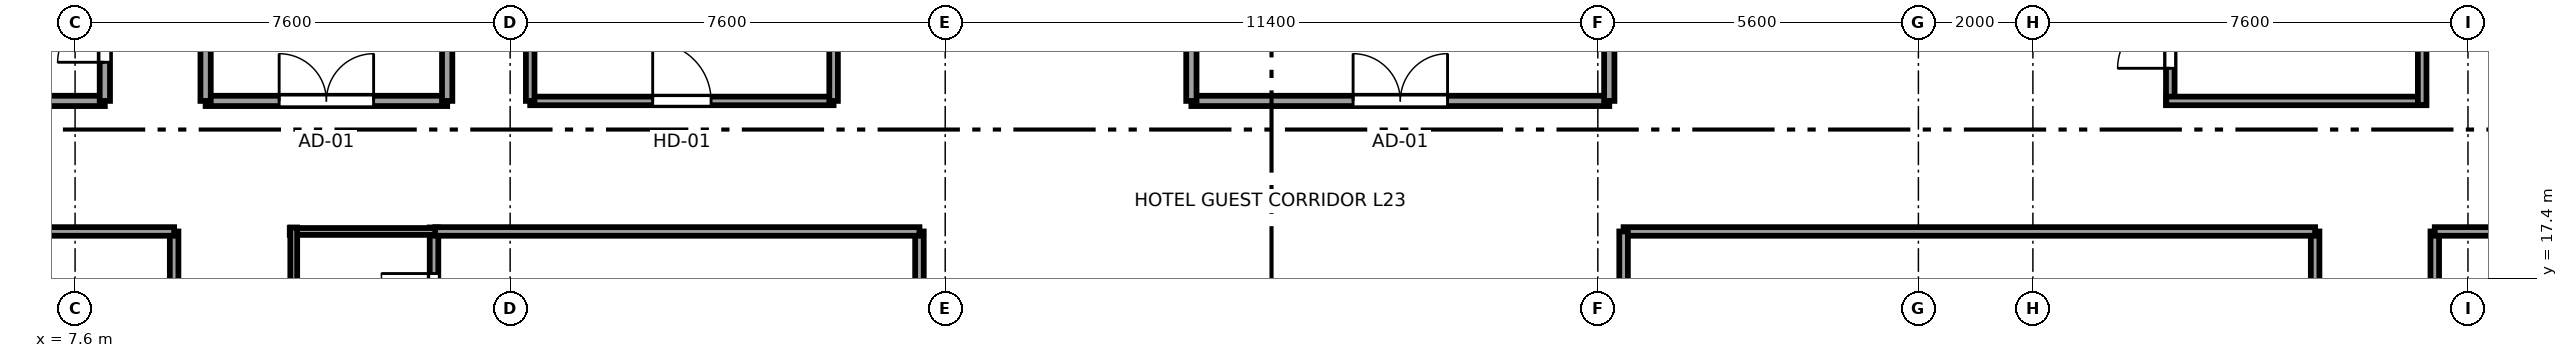
"""IFC4 building model, lengths in metres.
Left out: names, types, materials, properties, quantities, classifications, styles, units other than length and angle.
Written with IfcOpenShell. Run it as: python <this file> out.ifc"""

import sys

from ifc_helpers import new_model, si_unit, direction, frame, frame_2d, origin, place, context, subcontext, project, spatial, rectangle, extrude, source, transform, mapped, element, fill, save


model = new_model("IFC4")
c1 = context("Model", 3, precision=1e-05, world=origin(), true_north=direction((0.0, 1.0)))
c2 = subcontext(c1, "Body", "Model", "MODEL_VIEW")
j1 = project(units=[si_unit("LENGTHUNIT", "METRE"), si_unit("PLANEANGLEUNIT", "RADIAN")], contexts=[c1])
p1 = place(None, origin())
s1 = spatial("IfcSite", under=j1, at=p1, CompositionType="ELEMENT")
p2 = place(p1, origin())
s2 = spatial("IfcBuilding", under=s1, at=p2, CompositionType="ELEMENT")
p3 = place(p2, frame((0.0, 0.0, 92.35)))
s3 = spatial("IfcBuildingStorey", under=s2, at=p3, CompositionType="ELEMENT", Elevation=92.35)
p4 = place(p3, frame((13.87, 15.9, 0.0), z_axis=(0.0, 0.0, 1.0), x_axis=(0.0, 1.0, 0.0)))
e1 = element("IfcWall", 1, at=p4, inside=s3, PredefinedType="PARTITIONING", context=c2, shape_type="SweptSolid", body=[
    extrude(rectangle(XDim=2.39, YDim=0.15, at=frame_2d((1.195, 0.0))), origin(), (0.0, 0.0, 1.0), 3.25),
])
p5 = place(p4, frame((0.665, 0.0, 0.0)))
e2 = element("IfcOpeningElement", 2, at=p5, cuts=e1, PredefinedType="OPENING", context=c2, shape_type="SweptSolid", body=[
    extrude(rectangle(XDim=0.92, YDim=2.01, at=frame_2d((0.46, 1.005))), frame((0.0, 0.085, 0.0), z_axis=(0.0, -1.0, 0.0), x_axis=(1.0, 0.0, 0.0)), (0.0, 0.0, 1.0), 0.17),
])
p6 = place(p3, frame((11.35, 18.22, 0.0), z_axis=(0.0, 0.0, 1.0), x_axis=(1.0, 0.0, 0.0)))
e3 = element("IfcWall", 3, at=p6, inside=s3, PredefinedType="PLUMBINGWALL", context=c2, shape_type="SweptSolid", body=[
    extrude(rectangle(XDim=2.59, YDim=0.12, at=frame_2d((1.295, 0.0))), origin(), (0.0, 0.0, 1.0), 3.25),
])
p7 = place(p3, frame((11.42, 15.9, 0.0), z_axis=(0.0, 0.0, 1.0), x_axis=(0.0, 1.0, 0.0)))
e4 = element("IfcWall", 4, at=p7, inside=s3, PredefinedType="PLUMBINGWALL", context=c2, shape_type="SweptSolid", body=[
    extrude(rectangle(XDim=2.39, YDim=0.12, at=frame_2d((1.195, 0.0))), origin(), (0.0, 0.0, 1.0), 2.834),
])
p8 = place(p3, frame((9.33, 11.81, 0.0), z_axis=(0.0, 0.0, 1.0), x_axis=(0.0, 1.0, 0.0)))
e5 = element("IfcWall", 5, at=p8, inside=s3, PredefinedType="PARTITIONING", context=c2, shape_type="SweptSolid", body=[
    extrude(rectangle(XDim=6.41, YDim=0.15, at=frame_2d((3.205, 0.0))), origin(), (0.0, 0.0, 1.0), 3.25),
])
p9 = place(p8, frame((2.695, 0.0, 0.0)))
e6 = element("IfcOpeningElement", 6, at=p9, cuts=e5, PredefinedType="OPENING", context=c2, shape_type="SweptSolid", body=[
    extrude(rectangle(XDim=0.98, YDim=2.12, at=frame_2d((0.49, 1.06))), frame((0.0, 0.085, 0.0), z_axis=(0.0, -1.0, 0.0), x_axis=(1.0, 0.0, 0.0)), (0.0, 0.0, 1.0), 0.17),
])
p10 = place(p3, frame((0.405, 18.22, 0.0), z_axis=(0.0, 0.0, 1.0), x_axis=(1.0, 0.0, 0.0)))
e7 = element("IfcWall", 7, at=p10, inside=s3, PredefinedType="PARTITIONING", context=c2, shape_type="SweptSolid", body=[
    extrude(rectangle(XDim=8.925, YDim=0.15, at=frame_2d((4.462, 0.0))), origin(), (0.0, 0.0, 1.0), 3.25),
])
p11 = place(p3, frame((22.35, 0.405, 0.0), z_axis=(0.0, 0.0, 1.0), x_axis=(0.0, 1.0, 0.0)))
e8 = element("IfcWall", 8, at=p11, inside=s3, PredefinedType="PARTITIONING", context=c2, shape_type="SweptSolid", body=[
    extrude(rectangle(XDim=17.815, YDim=0.15, at=frame_2d((8.907, 0.0))), origin(), (0.0, 0.0, 1.0), 3.25),
])
p12 = place(p3, frame((13.89, 18.22, 0.0), z_axis=(0.0, 0.0, 1.0), x_axis=(1.0, 0.0, 0.0)))
e9 = element("IfcWall", 9, at=p12, inside=s3, PredefinedType="PARTITIONING", context=c2, shape_type="SweptSolid", body=[
    extrude(rectangle(XDim=8.46, YDim=0.15, at=frame_2d((4.23, 0.0))), origin(), (0.0, 0.0, 1.0), 3.25),
])
p13 = place(p3, frame((46.73, 11.76, 0.0), z_axis=(0.0, 0.0, 1.0), x_axis=(0.0, 1.0, 0.0)))
e10 = element("IfcWall", 10, at=p13, inside=s3, PredefinedType="PARTITIONING", context=c2, shape_type="SweptSolid", body=[
    extrude(rectangle(XDim=6.46, YDim=0.15, at=frame_2d((3.23, 0.0))), origin(), (0.0, 0.0, 1.0), 3.25),
])
p14 = place(p13, frame((2.72, 0.0, 0.0)))
e11 = element("IfcOpeningElement", 11, at=p14, cuts=e10, PredefinedType="OPENING", context=c2, shape_type="SweptSolid", body=[
    extrude(rectangle(XDim=0.98, YDim=2.12, at=frame_2d((0.49, 1.06))), frame((0.0, 0.085, 0.0), z_axis=(0.0, -1.0, 0.0), x_axis=(1.0, 0.0, 0.0)), (0.0, 0.0, 1.0), 0.17),
])
p15 = place(p3, frame((34.65, 18.22, 0.0), z_axis=(0.0, 0.0, 1.0), x_axis=(1.0, 0.0, 0.0)))
e12 = element("IfcWall", 12, at=p15, inside=s3, PredefinedType="PARTITIONING", context=c2, shape_type="SweptSolid", body=[
    extrude(rectangle(XDim=12.08, YDim=0.15, at=frame_2d((6.04, 0.0))), origin(), (0.0, 0.0, 1.0), 3.25),
])
p16 = place(p3, frame((34.65, 9.43, 0.0), z_axis=(0.0, 0.0, 1.0), x_axis=(0.0, 1.0, 0.0)))
e13 = element("IfcWall", 13, at=p16, inside=s3, PredefinedType="PARTITIONING", context=c2, shape_type="SweptSolid", body=[
    extrude(rectangle(XDim=8.79, YDim=0.15, at=frame_2d((4.395, 0.0))), origin(), (0.0, 0.0, 1.0), 3.25),
])
p17 = place(p3, frame((48.82, 11.81, 0.0), z_axis=(0.0, 0.0, 1.0), x_axis=(0.0, 1.0, 0.0)))
e14 = element("IfcWall", 14, at=p17, inside=s3, PredefinedType="PARTITIONING", context=c2, shape_type="SweptSolid", body=[
    extrude(rectangle(XDim=6.41, YDim=0.15, at=frame_2d((3.205, 0.0))), origin(), (0.0, 0.0, 1.0), 3.25),
])
p18 = place(p17, frame((1.745, 0.0, 0.0)))
e15 = element("IfcOpeningElement", 15, at=p18, cuts=e14, PredefinedType="OPENING", context=c2, shape_type="SweptSolid", body=[
    extrude(rectangle(XDim=0.98, YDim=2.12, at=frame_2d((0.49, 1.06))), frame((0.0, 0.085, 0.0), z_axis=(0.0, -1.0, 0.0), x_axis=(1.0, 0.0, 0.0)), (0.0, 0.0, 1.0), 0.17),
])
p19 = place(p3, frame((48.82, 18.22, 0.0), z_axis=(0.0, 0.0, 1.0), x_axis=(1.0, 0.0, 0.0)))
e16 = element("IfcWall", 16, at=p19, inside=s3, PredefinedType="PARTITIONING", context=c2, shape_type="SweptSolid", body=[
    extrude(rectangle(XDim=7.775, YDim=0.15, at=frame_2d((3.887, 0.0))), origin(), (0.0, 0.0, 1.0), 3.25),
])
p20 = place(p3, frame((0.405, 20.5, 0.0), z_axis=(0.0, 0.0, 1.0), x_axis=(1.0, 0.0, 0.0)))
e17 = element("IfcWall", 17, at=p20, inside=s3, PredefinedType="PARTITIONING", context=c2, shape_type="SweptSolid", body=[
    extrude(rectangle(XDim=7.715, YDim=0.18, at=frame_2d((3.857, 0.0))), origin(), (0.0, 0.0, 1.0), 3.25),
])
p21 = place(p3, frame((8.12, 20.5, 0.0), z_axis=(0.0, 0.0, 1.0), x_axis=(0.0, 1.0, 0.0)))
e18 = element("IfcWall", 18, at=p21, inside=s3, PredefinedType="PARTITIONING", context=c2, shape_type="SweptSolid", body=[
    extrude(rectangle(XDim=3.6, YDim=0.18, at=frame_2d((1.8, 0.0))), origin(), (0.0, 0.0, 1.0), 3.25),
])
p22 = place(p21, frame((0.675, 0.0, 0.0)))
e19 = element("IfcOpeningElement", 19, at=p22, cuts=e18, PredefinedType="OPENING", context=c2, shape_type="SweptSolid", body=[
    extrude(rectangle(XDim=1.65, YDim=2.15, at=frame_2d((0.825, 1.075))), frame((0.0, 0.1, 0.0), z_axis=(0.0, -1.0, 0.0), x_axis=(1.0, 0.0, 0.0)), (0.0, 0.0, 1.0), 0.2),
])
p23 = place(p3, frame((44.2, 20.43, 0.0), z_axis=(0.0, 0.0, 1.0), x_axis=(0.0, 1.0, 0.0)))
e20 = element("IfcWall", 20, at=p23, inside=s3, PredefinedType="PARTITIONING", context=c2, shape_type="SweptSolid", body=[
    extrude(rectangle(XDim=2.54, YDim=0.15, at=frame_2d((1.27, 0.0))), origin(), (0.0, 0.0, 1.0), 3.25),
])
p24 = place(p23, frame((0.64, 0.0, 0.0)))
e21 = element("IfcOpeningElement", 21, at=p24, cuts=e20, PredefinedType="OPENING", context=c2, shape_type="SweptSolid", body=[
    extrude(rectangle(XDim=0.92, YDim=2.01, at=frame_2d((0.46, 1.005))), frame((0.0, 0.085, 0.0), z_axis=(0.0, -1.0, 0.0), x_axis=(1.0, 0.0, 0.0)), (0.0, 0.0, 1.0), 0.17),
])
p25 = place(p3, frame((44.13, 20.5, 0.0), z_axis=(0.0, 0.0, 1.0), x_axis=(1.0, 0.0, 0.0)))
e22 = element("IfcWall", 22, at=p25, inside=s3, PredefinedType="PARTITIONING", context=c2, shape_type="SweptSolid", body=[
    extrude(rectangle(XDim=4.54, YDim=0.15, at=frame_2d((2.27, 0.0))), origin(), (0.0, 0.0, 1.0), 3.25),
])
p26 = place(p3, frame((48.6, 20.43, 0.0), z_axis=(0.0, 0.0, 1.0), x_axis=(0.0, 1.0, 0.0)))
e23 = element("IfcWall", 23, at=p26, inside=s3, PredefinedType="PARTITIONING", context=c2, shape_type="SweptSolid", body=[
    extrude(rectangle(XDim=2.54, YDim=0.15, at=frame_2d((1.27, 0.0))), origin(), (0.0, 0.0, 1.0), 3.25),
])
p27 = place(p3, frame((9.88, 20.5, 0.0), z_axis=(0.0, 0.0, 1.0), x_axis=(1.0, 0.0, 0.0)))
e24 = element("IfcWall", 24, at=p27, inside=s3, PredefinedType="PARTITIONING", context=c2, shape_type="SweptSolid", body=[
    extrude(rectangle(XDim=4.22, YDim=0.18, at=frame_2d((2.11, 0.0))), origin(), (0.0, 0.0, 1.0), 3.25),
])
p28 = place(p27, frame((1.285, 0.0, 0.0)))
e25 = element("IfcOpeningElement", 25, at=p28, cuts=e24, PredefinedType="OPENING", context=c2, shape_type="SweptSolid", body=[
    extrude(rectangle(XDim=1.65, YDim=2.15, at=frame_2d((0.825, 1.075))), frame((0.0, 0.1, 0.0), z_axis=(0.0, -1.0, 0.0), x_axis=(1.0, 0.0, 0.0)), (0.0, 0.0, 1.0), 0.2),
])
for number, where, z_axis, x_axis in (
    (26, (9.88, 20.5, 0.0), (0.0, 0.0, 1.0), (0.0, 1.0, 0.0)),
    (27, (14.1, 20.5, 0.0), (0.0, 0.0, 1.0), (0.0, 1.0, 0.0)),
):
    element("IfcWall", number, at=place(p3, frame(where, z_axis=z_axis, x_axis=x_axis)), inside=s3, PredefinedType="PARTITIONING", context=c2, shape_type="SweptSolid", body=[
        extrude(rectangle(XDim=9.25, YDim=0.18, at=frame_2d((4.625, 0.0))), origin(), (0.0, 0.0, 1.0), 3.25),
    ])
p29 = place(p3, frame((27.1, 20.5, 0.0), z_axis=(0.0, 0.0, 1.0), x_axis=(1.0, 0.0, 0.0)))
e28 = element("IfcWall", 28, at=p29, inside=s3, PredefinedType="PARTITIONING", context=c2, shape_type="SweptSolid", body=[
    extrude(rectangle(XDim=7.3, YDim=0.18, at=frame_2d((3.65, 0.0))), origin(), (0.0, 0.0, 1.0), 3.25),
])
p30 = place(p29, frame((2.825, 0.0, 0.0)))
e29 = element("IfcOpeningElement", 29, at=p30, cuts=e28, PredefinedType="OPENING", context=c2, shape_type="SweptSolid", body=[
    extrude(rectangle(XDim=1.65, YDim=2.15, at=frame_2d((0.825, 1.075))), frame((0.0, 0.1, 0.0), z_axis=(0.0, -1.0, 0.0), x_axis=(1.0, 0.0, 0.0)), (0.0, 0.0, 1.0), 0.2),
])
for number, where, z_axis, x_axis in (
    (30, (27.1, 20.5, 0.0), (0.0, 0.0, 1.0), (0.0, 1.0, 0.0)),
    (31, (34.4, 20.5, 0.0), (0.0, 0.0, 1.0), (0.0, 1.0, 0.0)),
):
    element("IfcWall", number, at=place(p3, frame(where, z_axis=z_axis, x_axis=x_axis)), inside=s3, PredefinedType="PARTITIONING", context=c2, shape_type="SweptSolid", body=[
        extrude(rectangle(XDim=9.3, YDim=0.18, at=frame_2d((4.65, 0.0))), origin(), (0.0, 0.0, 1.0), 3.25),
    ])
p31 = place(p3, frame((15.55, 20.5, 0.0), z_axis=(0.0, 0.0, 1.0), x_axis=(1.0, 0.0, 0.0)))
e32 = element("IfcWall", 32, at=p31, inside=s3, PredefinedType="PARTITIONING", context=c2, shape_type="SweptSolid", body=[
    extrude(rectangle(XDim=5.3, YDim=0.15, at=frame_2d((2.65, 0.0))), origin(), (0.0, 0.0, 1.0), 3.25),
])
p32 = place(p31, frame((2.14, 0.0, 0.0)))
e33 = element("IfcOpeningElement", 33, at=p32, cuts=e32, PredefinedType="OPENING", context=c2, shape_type="SweptSolid", body=[
    extrude(rectangle(XDim=1.02, YDim=2.03, at=frame_2d((0.51, 1.015))), frame((0.0, 0.085, 0.0), z_axis=(0.0, -1.0, 0.0), x_axis=(1.0, 0.0, 0.0)), (0.0, 0.0, 1.0), 0.17),
])
for number, where, z_axis, x_axis in (
    (34, (15.55, 20.5, 0.0), (0.0, 0.0, 1.0), (0.0, 1.0, 0.0)),
    (35, (20.85, 20.5, 0.0), (0.0, 0.0, 1.0), (0.0, 1.0, 0.0)),
):
    element("IfcWall", number, at=place(p3, frame(where, z_axis=z_axis, x_axis=x_axis)), inside=s3, PredefinedType="PARTITIONING", context=c2, shape_type="SweptSolid", body=[
        extrude(rectangle(XDim=9.3, YDim=0.15, at=frame_2d((4.65, 0.0))), origin(), (0.0, 0.0, 1.0), 3.25),
    ])
m1 = source(origin(), c2, "Body", "SweptSolid", [
    extrude(rectangle(XDim=0.92, YDim=2.01, at=frame_2d((0.46, 1.005))), frame((0.0, 0.025, 0.0), z_axis=(0.0, -1.0, 0.0), x_axis=(1.0, 0.0, 0.0)), (0.0, 0.0, 1.0), 0.05),
])
p33 = place(p5, origin())
e36 = element("IfcDoor", 36, at=p33, inside=s3, OperationType="SINGLE_SWING_RIGHT", PredefinedType="DOOR", context=c2, shape_type="MappedRepresentation", body=[
    mapped(m1, transform((0.0, 0.0, 0.0), x_axis=(1.0, 0.0, 0.0), y_axis=(0.0, 1.0, 0.0), z_axis=(0.0, 0.0, 1.0), scale=1.0)),
])
fill(e2, e36)
m2 = source(origin(), c2, "Body", "SweptSolid", [
    extrude(rectangle(XDim=1.65, YDim=2.15, at=frame_2d((0.825, 1.075))), frame((0.0, 0.025, 0.0), z_axis=(0.0, -1.0, 0.0), x_axis=(1.0, 0.0, 0.0)), (0.0, 0.0, 1.0), 0.05),
])
p34 = place(p22, origin())
e37 = element("IfcDoor", 37, at=p34, inside=s3, OperationType="DOUBLE_DOOR_SINGLE_SWING", PredefinedType="DOOR", context=c2, shape_type="MappedRepresentation", body=[
    mapped(m2, transform((0.0, 0.0, 0.0), x_axis=(1.0, 0.0, 0.0), y_axis=(0.0, 1.0, 0.0), z_axis=(0.0, 0.0, 1.0), scale=1.0)),
])
fill(e19, e37)
p35 = place(p24, origin())
e38 = element("IfcDoor", 38, at=p35, inside=s3, OperationType="SINGLE_SWING_LEFT", PredefinedType="DOOR", context=c2, shape_type="MappedRepresentation", body=[
    mapped(m1, transform((0.0, 0.0, 0.0), x_axis=(1.0, 0.0, 0.0), y_axis=(0.0, 1.0, 0.0), z_axis=(0.0, 0.0, 1.0), scale=1.0)),
])
fill(e21, e38)
p36 = place(p28, origin())
e39 = element("IfcDoor", 39, at=p36, inside=s3, OperationType="DOUBLE_DOOR_SINGLE_SWING", PredefinedType="DOOR", context=c2, shape_type="MappedRepresentation", body=[
    mapped(m2, transform((0.0, 0.0, 0.0), x_axis=(1.0, 0.0, 0.0), y_axis=(0.0, 1.0, 0.0), z_axis=(0.0, 0.0, 1.0), scale=1.0)),
])
fill(e25, e39)
p37 = place(p30, origin())
e40 = element("IfcDoor", 40, at=p37, inside=s3, OperationType="DOUBLE_DOOR_SINGLE_SWING", PredefinedType="DOOR", context=c2, shape_type="MappedRepresentation", body=[
    mapped(m2, transform((0.0, 0.0, 0.0), x_axis=(1.0, 0.0, 0.0), y_axis=(0.0, 1.0, 0.0), z_axis=(0.0, 0.0, 1.0), scale=1.0)),
])
fill(e29, e40)
m3 = source(origin(), c2, "Body", "SweptSolid", [
    extrude(rectangle(XDim=1.02, YDim=2.03, at=frame_2d((0.51, 1.015))), frame((0.0, 0.025, 0.0), z_axis=(0.0, -1.0, 0.0), x_axis=(1.0, 0.0, 0.0)), (0.0, 0.0, 1.0), 0.05),
])
p38 = place(p32, origin())
e41 = element("IfcDoor", 41, at=p38, inside=s3, OperationType="SINGLE_SWING_LEFT", PredefinedType="DOOR", context=c2, shape_type="MappedRepresentation", body=[
    mapped(m3, transform((0.0, 0.0, 0.0), x_axis=(1.0, 0.0, 0.0), y_axis=(0.0, 1.0, 0.0), z_axis=(0.0, 0.0, 1.0), scale=1.0)),
])
fill(e33, e41)
save(model, sys.argv[1])
